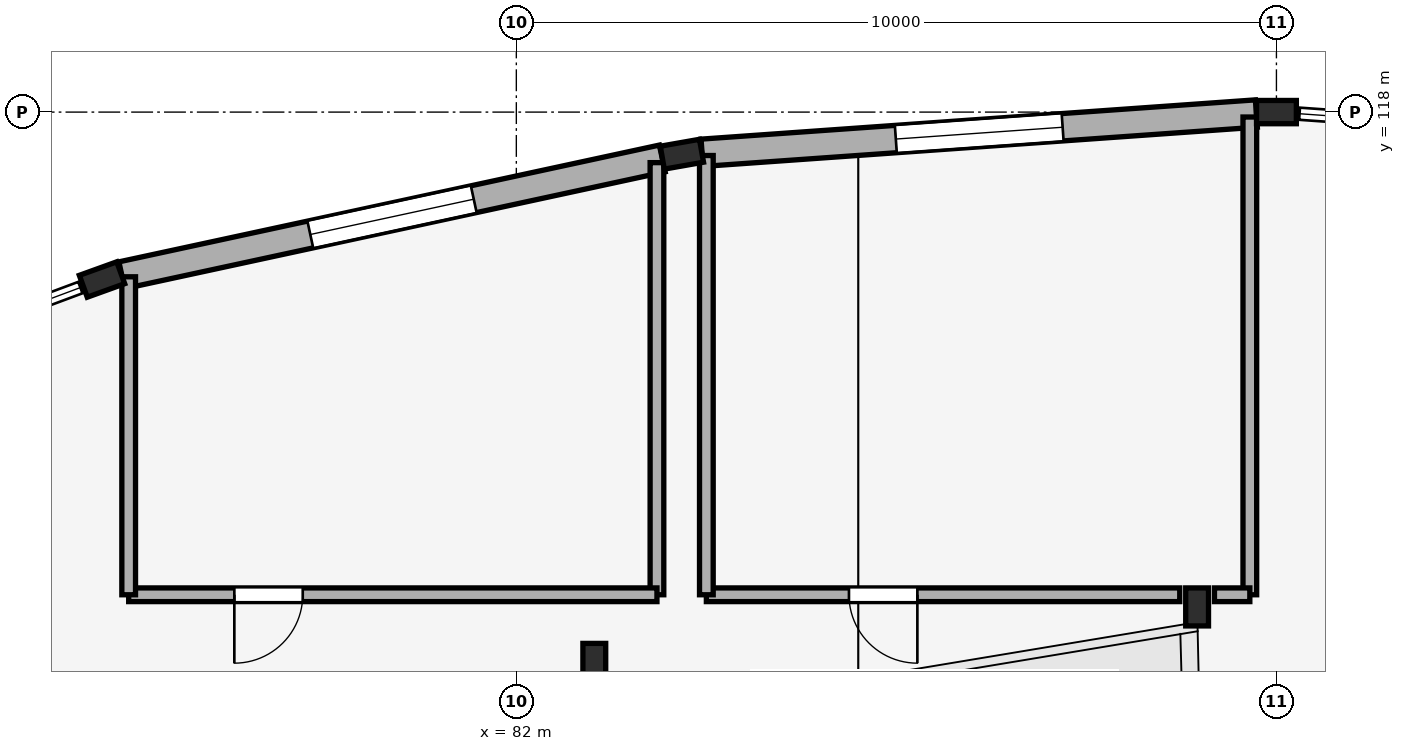
"""IFC4 building model, lengths in metres.
Left out: names, types, materials, properties, quantities, classifications, styles, units other than length and angle.
Written with IfcOpenShell. Run it as: python <this file> out.ifc"""

import sys

from ifc_helpers import new_model, si_unit, direction, frame, frame_2d, origin, origin_2d, place, context, subcontext, project, spatial, rectangle, i_section, extrude, element, fill, save


model = new_model("IFC4")
c1 = context("Model", 3, precision=1e-05, world=origin(), true_north=direction((0.0, 1.0)))
c2 = subcontext(c1, "Body", "Model", "MODEL_VIEW")
j1 = project(units=[si_unit("LENGTHUNIT", "METRE"), si_unit("PLANEANGLEUNIT", "RADIAN")], contexts=[c1])
p1 = place(None, origin())
s1 = spatial("IfcSite", under=j1, at=p1, CompositionType="ELEMENT")
p2 = place(p1, origin())
s2 = spatial("IfcBuilding", under=s1, at=p2, CompositionType="ELEMENT")
p3 = place(p2, frame((0.0, 0.0, 15.0)))
s3 = spatial("IfcBuildingStorey", under=s2, at=p3, CompositionType="ELEMENT", Elevation=15.0)
for number, where, z_axis, x_axis in (
    (1, (92.0, 118.0, 0.0), (0.0, 0.0, 1.0), (0.0, 1.0, 0.0)),
    (2, (84.178, 117.446, 0.0), (0.0, 0.0, 1.0), (-0.173, 0.985, 0.0)),
    (3, (76.549, 115.798, 0.0), (0.0, 0.0, 1.0), (-0.34, 0.941, 0.0)),
):
    element("IfcColumn", number, at=place(p3, frame(where, z_axis=z_axis, x_axis=x_axis)), inside=s3, PredefinedType="COLUMN", context=c2, shape_type="SweptSolid", body=[
        extrude(i_section(OverallWidth=0.306, OverallDepth=0.524, WebThickness=0.021, FlangeThickness=0.04, FilletRadius=0.027, at=origin_2d()), origin(), (0.0, 0.0, 1.0), 4.5),
    ])
for number, where, z_axis, x_axis in (
    (4, (90.956, 111.49, 0.0), (0.0, 0.0, 1.0), (1.0, 0.0, 0.0)),
    (5, (83.026, 110.76, 0.0), (0.0, 0.0, 1.0), (1.0, 0.0, 0.0)),
):
    element("IfcColumn", number, at=place(p3, frame(where, z_axis=z_axis, x_axis=x_axis)), inside=s3, PredefinedType="COLUMN", context=c2, shape_type="SweptSolid", body=[
        extrude(i_section(OverallWidth=0.3, OverallDepth=0.5, WebThickness=0.014, FlangeThickness=0.028, FilletRadius=0.027, at=origin_2d()), origin(), (0.0, 0.0, 1.0), 4.5),
    ])
p4 = place(p3, frame((76.81, 115.854, 0.0), z_axis=(0.0, 0.0, 1.0), x_axis=(0.977443945478, 0.211195012838, 0.0)))
e6 = element("IfcWall", 6, at=p4, inside=s3, PredefinedType="STANDARD", context=c2, shape_type="SweptSolid", body=[
    extrude(rectangle(XDim=7.275, YDim=0.36, at=frame_2d((3.637, 0.0))), origin(), (0.0, 0.0, 1.0), 3.562),
])
p5 = place(p4, frame((2.537, 0.0, 0.85)))
e7 = element("IfcOpeningElement", 7, at=p5, cuts=e6, PredefinedType="OPENING", context=c2, shape_type="SweptSolid", body=[
    extrude(rectangle(XDim=2.2, YDim=2.1, at=frame_2d((1.1, 1.05))), frame((0.0, 0.19, 0.0), z_axis=(0.0, -1.0, 0.0), x_axis=(1.0, 0.0, 0.0)), (0.0, 0.0, 1.0), 0.38),
])
p6 = place(p3, frame((84.443, 117.465, 0.0), z_axis=(0.0, 0.0, 1.0), x_axis=(0.99750291648, 0.070625290183, 0.0)))
e8 = element("IfcWall", 8, at=p6, inside=s3, PredefinedType="STANDARD", context=c2, shape_type="SweptSolid", body=[
    extrude(rectangle(XDim=7.311, YDim=0.36, at=frame_2d((3.656, 0.0))), origin(), (0.0, 0.0, 1.0), 3.562),
])
p7 = place(p6, frame((2.556, 0.0, 0.85)))
e9 = element("IfcOpeningElement", 9, at=p7, cuts=e8, PredefinedType="OPENING", context=c2, shape_type="SweptSolid", body=[
    extrude(rectangle(XDim=2.2, YDim=2.1, at=frame_2d((1.1, 1.05))), frame((0.0, 0.19, 0.0), z_axis=(0.0, -1.0, 0.0), x_axis=(1.0, 0.0, 0.0)), (0.0, 0.0, 1.0), 0.38),
])
p8 = place(p3, frame((83.85, 117.335, 0.0), z_axis=(0.0, 0.0, 1.0), x_axis=(0.0, -1.0, 0.0)))
e10 = element("IfcWall", 10, at=p8, inside=s3, PredefinedType="PARTITIONING", context=c2, shape_type="SweptSolid", body=[
    extrude(rectangle(XDim=5.685, YDim=0.18, at=frame_2d((2.843, 0.0))), origin(), (0.0, 0.0, 1.0), 4.25),
])
p9 = place(p3, frame((83.85, 111.65, 0.0), z_axis=(0.0, 0.0, 1.0), x_axis=(-1.0, 0.0, 0.0)))
e11 = element("IfcWall", 11, at=p9, inside=s3, PredefinedType="PARTITIONING", context=c2, shape_type="SweptSolid", body=[
    extrude(rectangle(XDim=6.95, YDim=0.18, at=frame_2d((3.475, 0.0))), origin(), (0.0, 0.0, 1.0), 4.25),
])
p10 = place(p9, frame((4.66, 0.0, 0.0)))
e12 = element("IfcOpeningElement", 12, at=p10, cuts=e11, PredefinedType="OPENING", context=c2, shape_type="SweptSolid", body=[
    extrude(rectangle(XDim=0.9, YDim=2.1, at=frame_2d((0.45, 1.05))), frame((0.0, 0.1, 0.0), z_axis=(0.0, -1.0, 0.0), x_axis=(1.0, 0.0, 0.0)), (0.0, 0.0, 1.0), 0.2),
])
p11 = place(p3, frame((76.9, 111.65, 0.0), z_axis=(0.0, 0.0, 1.0), x_axis=(0.0, 1.0, 0.0)))
e13 = element("IfcWall", 13, at=p11, inside=s3, PredefinedType="PARTITIONING", context=c2, shape_type="SweptSolid", body=[
    extrude(rectangle(XDim=4.183, YDim=0.18, at=frame_2d((2.092, 0.0))), origin(), (0.0, 0.0, 1.0), 4.25),
])
p12 = place(p3, frame((91.65, 117.935, 0.0), z_axis=(0.0, 0.0, 1.0), x_axis=(0.0, -1.0, 0.0)))
e14 = element("IfcWall", 14, at=p12, inside=s3, PredefinedType="PARTITIONING", context=c2, shape_type="SweptSolid", body=[
    extrude(rectangle(XDim=6.285, YDim=0.18, at=frame_2d((3.143, 0.0))), origin(), (0.0, 0.0, 1.0), 4.25),
])
p13 = place(p3, frame((91.65, 111.65, 0.0), z_axis=(0.0, 0.0, 1.0), x_axis=(-1.0, 0.0, 0.0)))
e15 = element("IfcWall", 15, at=p13, inside=s3, PredefinedType="PARTITIONING", context=c2, shape_type="SweptSolid", body=[
    extrude(rectangle(XDim=0.465, YDim=0.18, at=frame_2d((0.232, 0.0))), origin(), (0.0, 0.0, 1.0), 4.25),
])
p14 = place(p3, frame((90.728, 111.65, 0.0), z_axis=(0.0, 0.0, 1.0), x_axis=(-1.0, 0.0, 0.0)))
e16 = element("IfcWall", 16, at=p14, inside=s3, PredefinedType="PARTITIONING", context=c2, shape_type="SweptSolid", body=[
    extrude(rectangle(XDim=6.228, YDim=0.18, at=frame_2d((3.114, 0.0))), origin(), (0.0, 0.0, 1.0), 4.25),
])
p15 = place(p14, frame((3.452, 0.0, 0.0)))
e17 = element("IfcOpeningElement", 17, at=p15, cuts=e16, PredefinedType="OPENING", context=c2, shape_type="SweptSolid", body=[
    extrude(rectangle(XDim=0.9, YDim=2.1, at=frame_2d((0.45, 1.05))), frame((0.0, 0.1, 0.0), z_axis=(0.0, -1.0, 0.0), x_axis=(1.0, 0.0, 0.0)), (0.0, 0.0, 1.0), 0.2),
])
p16 = place(p3, frame((84.5, 111.65, 0.0), z_axis=(0.0, 0.0, 1.0), x_axis=(0.0, 1.0, 0.0)))
e18 = element("IfcWall", 18, at=p16, inside=s3, PredefinedType="PARTITIONING", context=c2, shape_type="SweptSolid", body=[
    extrude(rectangle(XDim=5.779, YDim=0.18, at=frame_2d((2.889, 0.0))), origin(), (0.0, 0.0, 1.0), 4.25),
])
p17 = place(p5, origin())
e19 = element("IfcWindow", 19, at=p17, inside=s3, PartitioningType="SINGLE_PANEL", PredefinedType="WINDOW", context=c2, shape_type="SweptSolid", body=[
    extrude(rectangle(XDim=2.2, YDim=2.1, at=frame_2d((1.1, 1.05))), frame((0.0, 0.03, 0.0), z_axis=(0.0, -1.0, 0.0), x_axis=(1.0, 0.0, 0.0)), (0.0, 0.0, 1.0), 0.06),
])
fill(e7, e19)
p18 = place(p7, origin())
e20 = element("IfcWindow", 20, at=p18, inside=s3, PartitioningType="SINGLE_PANEL", PredefinedType="WINDOW", context=c2, shape_type="SweptSolid", body=[
    extrude(rectangle(XDim=2.2, YDim=2.1, at=frame_2d((1.1, 1.05))), frame((0.0, 0.03, 0.0), z_axis=(0.0, -1.0, 0.0), x_axis=(1.0, 0.0, 0.0)), (0.0, 0.0, 1.0), 0.06),
])
fill(e9, e20)
p19 = place(p10, origin())
e21 = element("IfcDoor", 21, at=p19, inside=s3, OperationType="SINGLE_SWING_RIGHT", PredefinedType="DOOR", context=c2, shape_type="SweptSolid", body=[
    extrude(rectangle(XDim=0.9, YDim=2.1, at=frame_2d((0.45, 1.05))), frame((0.0, 0.025, 0.0), z_axis=(0.0, -1.0, 0.0), x_axis=(1.0, 0.0, 0.0)), (0.0, 0.0, 1.0), 0.05),
])
fill(e12, e21)
p20 = place(p15, origin())
e22 = element("IfcDoor", 22, at=p20, inside=s3, OperationType="SINGLE_SWING_LEFT", PredefinedType="DOOR", context=c2, shape_type="SweptSolid", body=[
    extrude(rectangle(XDim=0.9, YDim=2.1, at=frame_2d((0.45, 1.05))), frame((0.0, 0.025, 0.0), z_axis=(0.0, -1.0, 0.0), x_axis=(1.0, 0.0, 0.0)), (0.0, 0.0, 1.0), 0.05),
])
fill(e17, e22)
save(model, sys.argv[1])
